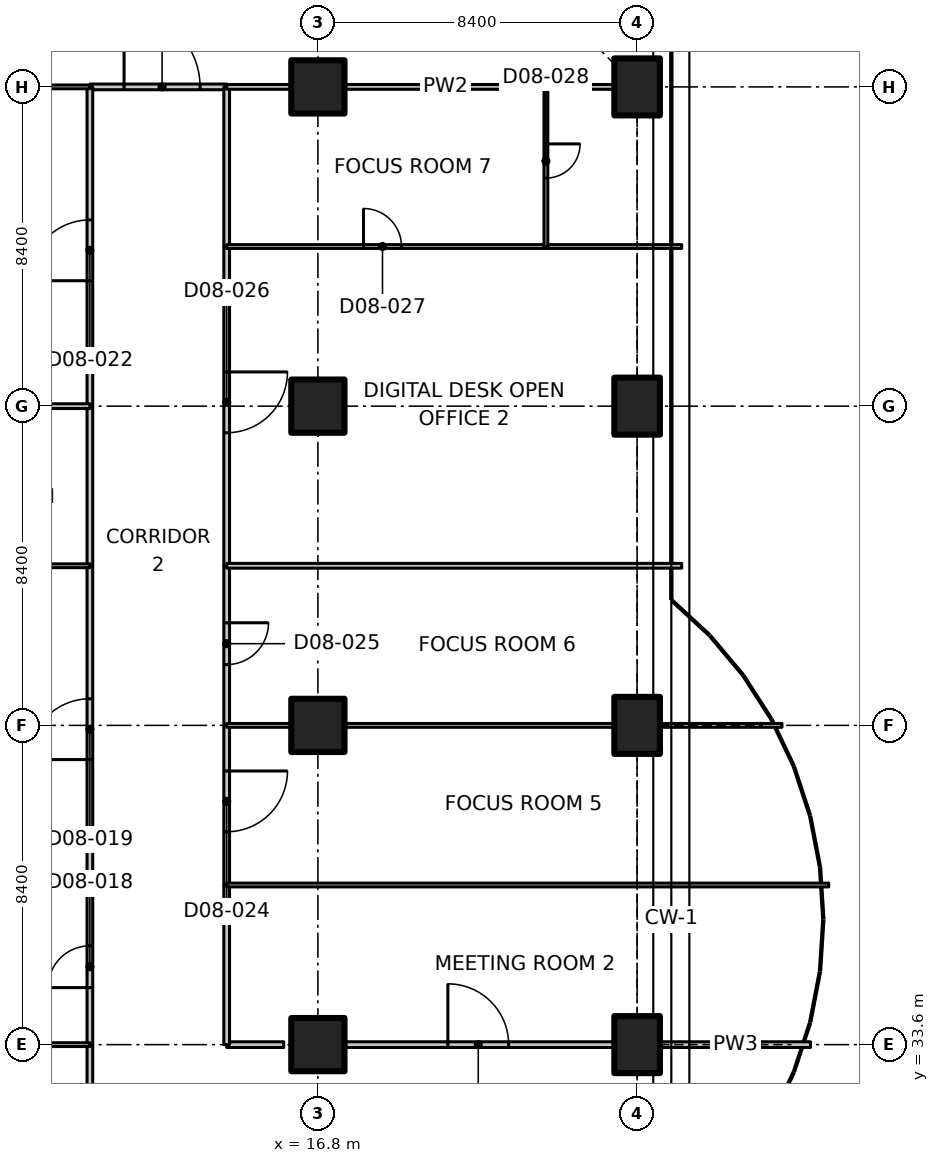
"""IFC4 building model, lengths in metres.
Left out: names, types, materials, properties, quantities, classifications, styles, units other than length and angle.
Written with IfcOpenShell. Run it as: python <this file> out.ifc"""

import sys

from ifc_helpers import new_model, si_unit, direction, frame, frame_2d, origin, origin_2d, place, context, subcontext, project, spatial, polyline, rectangle, outline, extrude, element, fill, save


model = new_model("IFC4")
c1 = context("Model", 3, precision=1e-05, world=origin(), true_north=direction((0.0, 1.0)))
c2 = subcontext(c1, "Body", "Model", "MODEL_VIEW")
j1 = project(units=[si_unit("LENGTHUNIT", "METRE"), si_unit("PLANEANGLEUNIT", "RADIAN")], contexts=[c1])
p1 = place(None, origin())
s1 = spatial("IfcSite", under=j1, at=p1, CompositionType="ELEMENT")
p2 = place(p1, origin())
s2 = spatial("IfcBuilding", under=s1, at=p2, CompositionType="ELEMENT")
p3 = place(p2, frame((0.0, 0.0, 50.9)))
s3 = spatial("IfcBuildingStorey", under=s2, at=p3, CompositionType="ELEMENT", Elevation=50.9)
for number, where, z_axis, x_axis in (
    (1, (16.8, 33.6, 0.0), (0.0, 0.0, 1.0), (1.0, 0.0, 0.0)),
    (2, (16.8, 42.0, 0.0), (0.0, 0.0, 1.0), (1.0, 0.0, 0.0)),
    (3, (16.8, 50.4, 0.0), (0.0, 0.0, 1.0), (1.0, 0.0, 0.0)),
    (4, (16.8, 58.8, 0.0), (0.0, 0.0, 1.0), (1.0, 0.0, 0.0)),
):
    element("IfcColumn", number, at=place(p3, frame(where, z_axis=z_axis, x_axis=x_axis)), inside=s3, PredefinedType="COLUMN", context=c2, shape_type="SweptSolid", body=[
        extrude(rectangle(XDim=1.4, YDim=1.4, at=origin_2d()), origin(), (0.0, 0.0, 1.0), 3.35),
    ])
for number, where, z_axis, x_axis in (
    (5, (25.2, 33.6, 0.0), (0.0, 0.0, 1.0), (1.0, 0.0, 0.0)),
    (6, (25.2, 42.0, 0.0), (0.0, 0.0, 1.0), (1.0, 0.0, 0.0)),
    (7, (25.2, 50.4, 0.0), (0.0, 0.0, 1.0), (1.0, 0.0, 0.0)),
    (8, (25.2, 58.8, 0.0), (0.0, 0.0, 1.0), (1.0, 0.0, 0.0)),
):
    element("IfcColumn", number, at=place(p3, frame(where, z_axis=z_axis, x_axis=x_axis)), inside=s3, PredefinedType="COLUMN", context=c2, shape_type="SweptSolid", body=[
        extrude(rectangle(XDim=1.2, YDim=1.5, at=origin_2d()), origin(), (0.0, 0.0, 1.0), 3.35),
    ])
p4 = place(p3, frame((10.8, 29.4, 0.0), z_axis=(0.0, 0.0, 1.0), x_axis=(0.0, 1.0, 0.0)))
e9 = element("IfcWall", 9, at=p4, inside=s3, PredefinedType="PARTITIONING", context=c2, shape_type="SweptSolid", body=[
    extrude(rectangle(XDim=4.2, YDim=0.15, at=frame_2d((2.1, 0.0))), origin(), (0.0, 0.0, 1.0), 3.33),
])
p5 = place(p4, frame((1.5, 0.0, 0.0)))
e10 = element("IfcOpeningElement", 10, at=p5, cuts=e9, PredefinedType="OPENING", context=c2, shape_type="SweptSolid", body=[
    extrude(rectangle(XDim=1.1, YDim=2.1, at=frame_2d((0.55, 1.05))), frame((0.0, 0.085, 0.0), z_axis=(0.0, -1.0, 0.0), x_axis=(1.0, 0.0, 0.0)), (0.0, 0.0, 1.0), 0.17),
])
p6 = place(p3, frame((14.4, 33.6, 0.0), z_axis=(0.0, 0.0, 1.0), x_axis=(1.0, 0.0, 0.0)))
e11 = element("IfcWall", 11, at=p6, inside=s3, PredefinedType="PARTITIONING", context=c2, shape_type="SweptSolid", body=[
    extrude(rectangle(XDim=1.5, YDim=0.15, at=frame_2d((0.75, 0.0))), origin(), (0.0, 0.0, 1.0), 3.33),
])
p7 = place(p3, frame((17.52, 33.6, 0.0), z_axis=(0.0, 0.0, 1.0), x_axis=(1.0, 0.0, 0.0)))
e12 = element("IfcWall", 12, at=p7, inside=s3, PredefinedType="PARTITIONING", context=c2, shape_type="SweptSolid", body=[
    extrude(rectangle(XDim=7.06, YDim=0.15, at=frame_2d((3.53, 0.0))), origin(), (0.0, 0.0, 1.0), 3.33),
])
p8 = place(p7, frame((2.7, 0.0, 0.0)))
e13 = element("IfcOpeningElement", 13, at=p8, cuts=e12, PredefinedType="OPENING", context=c2, shape_type="SweptSolid", body=[
    extrude(rectangle(XDim=1.6, YDim=2.1, at=frame_2d((0.8, 1.05))), frame((0.0, 0.085, 0.0), z_axis=(0.0, -1.0, 0.0), x_axis=(1.0, 0.0, 0.0)), (0.0, 0.0, 1.0), 0.17),
])
p9 = place(p3, frame((25.82, 33.6, 0.0), z_axis=(0.0, 0.0, 1.0), x_axis=(1.0, 0.0, 0.0)))
e14 = element("IfcWall", 14, at=p9, inside=s3, PredefinedType="PARTITIONING", context=c2, shape_type="SweptSolid", body=[
    extrude(rectangle(XDim=3.942, YDim=0.15, at=frame_2d((1.971, 0.0))), origin(), (0.0, 0.0, 1.0), 2.98),
])
p10 = place(p3, frame((10.8, 58.8, 0.0), z_axis=(0.0, 0.0, 1.0), x_axis=(1.0, 0.0, 0.0)))
e15 = element("IfcWall", 15, at=p10, inside=s3, PredefinedType="PARTITIONING", context=c2, shape_type="SweptSolid", body=[
    extrude(rectangle(XDim=3.6, YDim=0.15, at=frame_2d((1.8, 0.0))), origin(), (0.0, 0.0, 1.0), 3.33),
])
p11 = place(p10, frame((0.9, 0.0, 0.0)))
e16 = element("IfcOpeningElement", 16, at=p11, cuts=e15, PredefinedType="OPENING", context=c2, shape_type="SweptSolid", body=[
    extrude(rectangle(XDim=2.0, YDim=2.4, at=frame_2d((1.0, 1.2))), frame((0.0, 0.085, 0.0), z_axis=(0.0, -1.0, 0.0), x_axis=(1.0, 0.0, 0.0)), (0.0, 0.0, 1.0), 0.17),
])
p12 = place(p3, frame((10.8, 33.6, 0.0), z_axis=(0.0, 0.0, 1.0), x_axis=(0.0, 1.0, 0.0)))
e17 = element("IfcWall", 17, at=p12, inside=s3, PredefinedType="PARTITIONING", context=c2, shape_type="SweptSolid", body=[
    extrude(rectangle(XDim=4.2, YDim=0.15, at=frame_2d((2.1, 0.0))), origin(), (0.0, 0.0, 1.0), 3.33),
])
p13 = place(p12, frame((1.5, 0.0, 0.0)))
e18 = element("IfcOpeningElement", 18, at=p13, cuts=e17, PredefinedType="OPENING", context=c2, shape_type="SweptSolid", body=[
    extrude(rectangle(XDim=1.1, YDim=2.1, at=frame_2d((0.55, 1.05))), frame((0.0, 0.085, 0.0), z_axis=(0.0, -1.0, 0.0), x_axis=(1.0, 0.0, 0.0)), (0.0, 0.0, 1.0), 0.17),
])
p14 = place(p3, frame((10.8, 37.8, 0.0), z_axis=(0.0, 0.0, 1.0), x_axis=(0.0, 1.0, 0.0)))
e19 = element("IfcWall", 19, at=p14, inside=s3, PredefinedType="PARTITIONING", context=c2, shape_type="SweptSolid", body=[
    extrude(rectangle(XDim=8.4, YDim=0.15, at=frame_2d((4.2, 0.0))), origin(), (0.0, 0.0, 1.0), 3.33),
])
p15 = place(p14, frame((3.3, 0.0, 0.0)))
e20 = element("IfcOpeningElement", 20, at=p15, cuts=e19, PredefinedType="OPENING", context=c2, shape_type="SweptSolid", body=[
    extrude(rectangle(XDim=1.6, YDim=2.1, at=frame_2d((0.8, 1.05))), frame((0.0, 0.085, 0.0), z_axis=(0.0, -1.0, 0.0), x_axis=(1.0, 0.0, 0.0)), (0.0, 0.0, 1.0), 0.17),
])
p16 = place(p3, frame((10.8, 46.2, 0.0), z_axis=(0.0, 0.0, 1.0), x_axis=(0.0, 1.0, 0.0)))
e21 = element("IfcWall", 21, at=p16, inside=s3, PredefinedType="PARTITIONING", context=c2, shape_type="SweptSolid", body=[
    extrude(rectangle(XDim=4.2, YDim=0.15, at=frame_2d((2.1, 0.0))), origin(), (0.0, 0.0, 1.0), 3.33),
])
p17 = place(p3, frame((10.8, 50.4, 0.0), z_axis=(0.0, 0.0, 1.0), x_axis=(0.0, 1.0, 0.0)))
e22 = element("IfcWall", 22, at=p17, inside=s3, PredefinedType="PARTITIONING", context=c2, shape_type="SweptSolid", body=[
    extrude(rectangle(XDim=8.4, YDim=0.15, at=frame_2d((4.2, 0.0))), origin(), (0.0, 0.0, 1.0), 3.33),
])
p18 = place(p17, frame((3.3, 0.0, 0.0)))
e23 = element("IfcOpeningElement", 23, at=p18, cuts=e22, PredefinedType="OPENING", context=c2, shape_type="SweptSolid", body=[
    extrude(rectangle(XDim=1.6, YDim=2.1, at=frame_2d((0.8, 1.05))), frame((0.0, 0.085, 0.0), z_axis=(0.0, -1.0, 0.0), x_axis=(1.0, 0.0, 0.0)), (0.0, 0.0, 1.0), 0.17),
])
p19 = place(p3, frame((14.4, 37.8, 0.0), z_axis=(0.0, 0.0, 1.0), x_axis=(0.0, -1.0, 0.0)))
e24 = element("IfcWall", 24, at=p19, inside=s3, PredefinedType="PARTITIONING", context=c2, shape_type="SweptSolid", body=[
    extrude(rectangle(XDim=4.2, YDim=0.15, at=frame_2d((2.1, 0.0))), origin(), (0.0, 0.0, 1.0), 3.33),
])
p20 = place(p3, frame((14.4, 42.0, 0.0), z_axis=(0.0, 0.0, 1.0), x_axis=(0.0, -1.0, 0.0)))
e25 = element("IfcWall", 25, at=p20, inside=s3, PredefinedType="PARTITIONING", context=c2, shape_type="SweptSolid", body=[
    extrude(rectangle(XDim=4.2, YDim=0.15, at=frame_2d((2.1, 0.0))), origin(), (0.0, 0.0, 1.0), 3.33),
])
p21 = place(p20, frame((1.2, 0.0, 0.0)))
e26 = element("IfcOpeningElement", 26, at=p21, cuts=e25, PredefinedType="OPENING", context=c2, shape_type="SweptSolid", body=[
    extrude(rectangle(XDim=1.6, YDim=2.1, at=frame_2d((0.8, 1.05))), frame((0.0, 0.085, 0.0), z_axis=(0.0, -1.0, 0.0), x_axis=(1.0, 0.0, 0.0)), (0.0, 0.0, 1.0), 0.17),
])
p22 = place(p3, frame((14.4, 46.2, 0.0), z_axis=(0.0, 0.0, 1.0), x_axis=(0.0, -1.0, 0.0)))
e27 = element("IfcWall", 27, at=p22, inside=s3, PredefinedType="PARTITIONING", context=c2, shape_type="SweptSolid", body=[
    extrude(rectangle(XDim=4.2, YDim=0.15, at=frame_2d((2.1, 0.0))), origin(), (0.0, 0.0, 1.0), 3.33),
])
p23 = place(p22, frame((1.5, 0.0, 0.0)))
e28 = element("IfcOpeningElement", 28, at=p23, cuts=e27, PredefinedType="OPENING", context=c2, shape_type="SweptSolid", body=[
    extrude(rectangle(XDim=1.1, YDim=2.1, at=frame_2d((0.55, 1.05))), frame((0.0, 0.085, 0.0), z_axis=(0.0, -1.0, 0.0), x_axis=(1.0, 0.0, 0.0)), (0.0, 0.0, 1.0), 0.17),
])
p24 = place(p3, frame((14.4, 54.6, 0.0), z_axis=(0.0, 0.0, 1.0), x_axis=(0.0, -1.0, 0.0)))
e29 = element("IfcWall", 29, at=p24, inside=s3, PredefinedType="PARTITIONING", context=c2, shape_type="SweptSolid", body=[
    extrude(rectangle(XDim=8.4, YDim=0.15, at=frame_2d((4.2, 0.0))), origin(), (0.0, 0.0, 1.0), 3.33),
])
p25 = place(p24, frame((3.3, 0.0, 0.0)))
e30 = element("IfcOpeningElement", 30, at=p25, cuts=e29, PredefinedType="OPENING", context=c2, shape_type="SweptSolid", body=[
    extrude(rectangle(XDim=1.6, YDim=2.1, at=frame_2d((0.8, 1.05))), frame((0.0, 0.085, 0.0), z_axis=(0.0, -1.0, 0.0), x_axis=(1.0, 0.0, 0.0)), (0.0, 0.0, 1.0), 0.17),
])
p26 = place(p3, frame((14.4, 58.8, 0.0), z_axis=(0.0, 0.0, 1.0), x_axis=(0.0, -1.0, 0.0)))
e31 = element("IfcWall", 31, at=p26, inside=s3, PredefinedType="PARTITIONING", context=c2, shape_type="SweptSolid", body=[
    extrude(rectangle(XDim=4.2, YDim=0.15, at=frame_2d((2.1, 0.0))), origin(), (0.0, 0.0, 1.0), 3.33),
])
p27 = place(p3, frame((10.8, 58.8, 0.0), z_axis=(0.0, 0.0, 1.0), x_axis=(-1.0, 0.0, 0.0)))
e32 = element("IfcWall", 32, at=p27, inside=s3, PredefinedType="PARTITIONING", context=c2, shape_type="SweptSolid", body=[
    extrude(rectangle(XDim=1.68, YDim=0.1, at=frame_2d((0.84, 0.0))), origin(), (0.0, 0.0, 1.0), 3.33),
])
p28 = place(p3, frame((22.8, 58.8, 0.0), z_axis=(0.0, 0.0, 1.0), x_axis=(-1.0, 0.0, 0.0)))
e33 = element("IfcWall", 33, at=p28, inside=s3, PredefinedType="PARTITIONING", context=c2, shape_type="SweptSolid", body=[
    extrude(rectangle(XDim=5.28, YDim=0.125, at=frame_2d((2.64, 0.0))), origin(), (0.0, 0.0, 1.0), 3.33),
])
p29 = place(p3, frame((16.08, 58.8, 0.0), z_axis=(0.0, 0.0, 1.0), x_axis=(-1.0, 0.0, 0.0)))
e34 = element("IfcWall", 34, at=p29, inside=s3, PredefinedType="PARTITIONING", context=c2, shape_type="SweptSolid", body=[
    extrude(rectangle(XDim=1.68, YDim=0.125, at=frame_2d((0.84, 0.0))), origin(), (0.0, 0.0, 1.0), 3.33),
])
p30 = place(p3, frame((24.58, 58.8, 0.0), z_axis=(0.0, 0.0, 1.0), x_axis=(-1.0, 0.0, 0.0)))
e35 = element("IfcWall", 35, at=p30, inside=s3, PredefinedType="PARTITIONING", context=c2, shape_type="SweptSolid", body=[
    extrude(rectangle(XDim=1.78, YDim=0.125, at=frame_2d((0.89, 0.0))), origin(), (0.0, 0.0, 1.0), 3.33),
])
p31 = place(p3, frame((9.12, 33.6, 0.0), z_axis=(0.0, 0.0, 1.0), x_axis=(1.0, 0.0, 0.0)))
e36 = element("IfcWall", 36, at=p31, inside=s3, PredefinedType="PARTITIONING", context=c2, shape_type="SweptSolid", body=[
    extrude(rectangle(XDim=1.68, YDim=0.1, at=frame_2d((0.84, 0.0))), origin(), (0.0, 0.0, 1.0), 3.33),
])
p32 = place(p3, frame((-1.174, 37.8, 0.0), z_axis=(0.0, 0.0, 1.0), x_axis=(1.0, 0.0, 0.0)))
e37 = element("IfcWall", 37, at=p32, inside=s3, PredefinedType="PARTITIONING", context=c2, shape_type="SweptSolid", body=[
    extrude(outline(polyline([(0.0, 0.0), (11.974, 0.0), (11.974, 3.33), (1.624, 3.33), (1.622, 2.98), (0.726, 2.98), (0.724, 3.33), (0.074, 3.33), (0.0, 3.33), (0.0, 0.0)])), frame((0.0, 0.062, 0.0), z_axis=(0.0, -1.0, 0.0), x_axis=(1.0, 0.0, 0.0)), (0.0, 0.0, 1.0), 0.125),
])
p33 = place(p3, frame((6.0, 46.2, 0.0), z_axis=(0.0, 0.0, 1.0), x_axis=(1.0, 0.0, 0.0)))
e38 = element("IfcWall", 38, at=p33, inside=s3, PredefinedType="PARTITIONING", context=c2, shape_type="SweptSolid", body=[
    extrude(rectangle(XDim=4.8, YDim=0.1, at=frame_2d((2.4, 0.0))), origin(), (0.0, 0.0, 1.0), 3.33),
])
p34 = place(p33, frame((1.8, 0.0, 0.0)))
e39 = element("IfcOpeningElement", 39, at=p34, cuts=e38, PredefinedType="OPENING", context=c2, shape_type="SweptSolid", body=[
    extrude(rectangle(XDim=1.0, YDim=2.1, at=frame_2d((0.5, 1.05))), frame((0.0, 0.06, 0.0), z_axis=(0.0, -1.0, 0.0), x_axis=(1.0, 0.0, 0.0)), (0.0, 0.0, 1.0), 0.12),
])
p35 = place(p3, frame((9.12, 50.4, 0.0), z_axis=(0.0, 0.0, 1.0), x_axis=(1.0, 0.0, 0.0)))
e40 = element("IfcWall", 40, at=p35, inside=s3, PredefinedType="PARTITIONING", context=c2, shape_type="SweptSolid", body=[
    extrude(rectangle(XDim=1.68, YDim=0.125, at=frame_2d((0.84, 0.0))), origin(), (0.0, 0.0, 1.0), 3.33),
])
p36 = place(p3, frame((14.4, 37.8, 0.0), z_axis=(0.0, 0.0, 1.0), x_axis=(1.0, 0.0, 0.0)))
e41 = element("IfcWall", 41, at=p36, inside=s3, PredefinedType="PARTITIONING", context=c2, shape_type="SweptSolid", body=[
    extrude(outline(polyline([(0.0, 0.0), (15.843, 0.0), (15.843, 3.33), (11.25, 3.33), (11.248, 2.98), (10.352, 2.98), (10.35, 3.33), (0.0, 3.33), (0.0, 0.0)])), frame((0.0, 0.05, 0.0), z_axis=(0.0, -1.0, 0.0), x_axis=(1.0, 0.0, 0.0)), (0.0, 0.0, 1.0), 0.1),
])
p37 = place(p3, frame((14.4, 42.0, 0.0), z_axis=(0.0, 0.0, 1.0), x_axis=(1.0, 0.0, 0.0)))
e42 = element("IfcWall", 42, at=p37, inside=s3, PredefinedType="PARTITIONING", context=c2, shape_type="SweptSolid", body=[
    extrude(rectangle(XDim=1.68, YDim=0.1, at=frame_2d((0.84, 0.0))), origin(), (0.0, 0.0, 1.0), 3.33),
])
p38 = place(p3, frame((17.52, 42.0, 0.0), z_axis=(0.0, 0.0, 1.0), x_axis=(1.0, 0.0, 0.0)))
e43 = element("IfcWall", 43, at=p38, inside=s3, PredefinedType="PARTITIONING", context=c2, shape_type="SweptSolid", body=[
    extrude(rectangle(XDim=7.06, YDim=0.1, at=frame_2d((3.53, 0.0))), origin(), (0.0, 0.0, 1.0), 3.33),
])
p39 = place(p3, frame((25.82, 42.0, 0.0), z_axis=(0.0, 0.0, 1.0), x_axis=(1.0, 0.0, 0.0)))
e44 = element("IfcWall", 44, at=p39, inside=s3, PredefinedType="PARTITIONING", context=c2, shape_type="SweptSolid", body=[
    extrude(rectangle(XDim=3.191, YDim=0.1, at=frame_2d((1.596, 0.0))), origin(), (0.0, 0.0, 1.0), 2.98),
])
p40 = place(p3, frame((14.4, 46.2, 0.0), z_axis=(0.0, 0.0, 1.0), x_axis=(1.0, 0.0, 0.0)))
e45 = element("IfcWall", 45, at=p40, inside=s3, PredefinedType="PARTITIONING", context=c2, shape_type="SweptSolid", body=[
    extrude(outline(polyline([(0.0, 0.0), (11.974, 0.0), (11.974, 3.33), (11.9, 3.33), (11.25, 3.33), (11.248, 2.98), (10.352, 2.98), (10.35, 3.33), (0.0, 3.33), (0.0, 0.0)])), frame((0.0, 0.062, 0.0), z_axis=(0.0, -1.0, 0.0), x_axis=(1.0, 0.0, 0.0)), (0.0, 0.0, 1.0), 0.125),
])
p41 = place(p3, frame((14.4, 54.6, 0.0), z_axis=(0.0, 0.0, 1.0), x_axis=(1.0, 0.0, 0.0)))
e46 = element("IfcWall", 46, at=p41, inside=s3, PredefinedType="PARTITIONING", context=c2, shape_type="SweptSolid", body=[
    extrude(rectangle(XDim=8.4, YDim=0.1, at=frame_2d((4.2, 0.0))), origin(), (0.0, 0.0, 1.0), 3.33),
])
p42 = place(p41, frame((3.6, 0.0, 0.0)))
e47 = element("IfcOpeningElement", 47, at=p42, cuts=e46, PredefinedType="OPENING", context=c2, shape_type="SweptSolid", body=[
    extrude(rectangle(XDim=1.0, YDim=2.1, at=frame_2d((0.5, 1.05))), frame((0.0, 0.06, 0.0), z_axis=(0.0, -1.0, 0.0), x_axis=(1.0, 0.0, 0.0)), (0.0, 0.0, 1.0), 0.12),
])
p43 = place(p3, frame((22.8, 54.6, 0.0), z_axis=(0.0, 0.0, 1.0), x_axis=(1.0, 0.0, 0.0)))
e48 = element("IfcWall", 48, at=p43, inside=s3, PredefinedType="PARTITIONING", context=c2, shape_type="SweptSolid", body=[
    extrude(rectangle(XDim=3.574, YDim=0.1, at=frame_2d((1.787, 0.0))), origin(), (0.0, 0.0, 1.0), 2.98),
])
p44 = place(p3, frame((22.8, 58.8, 0.0), z_axis=(0.0, 0.0, 1.0), x_axis=(0.0, -1.0, 0.0)))
e49 = element("IfcWall", 49, at=p44, inside=s3, PredefinedType="PARTITIONING", context=c2, shape_type="SweptSolid", body=[
    extrude(rectangle(XDim=4.2, YDim=0.1, at=frame_2d((2.1, 0.0))), origin(), (0.0, 0.0, 1.0), 3.33),
])
p45 = place(p44, frame((1.5, 0.0, 0.0)))
e50 = element("IfcOpeningElement", 50, at=p45, cuts=e49, PredefinedType="OPENING", context=c2, shape_type="SweptSolid", body=[
    extrude(rectangle(XDim=0.9, YDim=2.1, at=frame_2d((0.45, 1.05))), frame((0.0, 0.06, 0.0), z_axis=(0.0, -1.0, 0.0), x_axis=(1.0, 0.0, 0.0)), (0.0, 0.0, 1.0), 0.12),
])
p46 = place(p11, origin())
e51 = element("IfcDoor", 51, at=p46, inside=s3, OperationType="DOUBLE_DOOR_SINGLE_SWING", PredefinedType="DOOR", context=c2, shape_type="SweptSolid", body=[
    extrude(rectangle(XDim=2.0, YDim=2.4, at=frame_2d((1.0, 1.2))), frame((0.0, 0.025, 0.0), z_axis=(0.0, -1.0, 0.0), x_axis=(1.0, 0.0, 0.0)), (0.0, 0.0, 1.0), 0.05),
])
fill(e16, e51)
p47 = place(p13, origin())
e52 = element("IfcDoor", 52, at=p47, inside=s3, OperationType="SINGLE_SWING_LEFT", PredefinedType="DOOR", context=c2, shape_type="SweptSolid", body=[
    extrude(rectangle(XDim=1.1, YDim=2.1, at=frame_2d((0.55, 1.05))), frame((0.0, 0.025, 0.0), z_axis=(0.0, -1.0, 0.0), x_axis=(1.0, 0.0, 0.0)), (0.0, 0.0, 1.0), 0.05),
])
fill(e18, e52)
p48 = place(p15, origin())
e53 = element("IfcDoor", 53, at=p48, inside=s3, OperationType="DOUBLE_DOOR_SINGLE_SWING", PredefinedType="DOOR", context=c2, shape_type="SweptSolid", body=[
    extrude(rectangle(XDim=1.6, YDim=2.1, at=frame_2d((0.8, 1.05))), frame((0.0, 0.025, 0.0), z_axis=(0.0, -1.0, 0.0), x_axis=(1.0, 0.0, 0.0)), (0.0, 0.0, 1.0), 0.05),
])
fill(e20, e53)
p49 = place(p18, origin())
e54 = element("IfcDoor", 54, at=p49, inside=s3, OperationType="DOUBLE_DOOR_SINGLE_SWING", PredefinedType="DOOR", context=c2, shape_type="SweptSolid", body=[
    extrude(rectangle(XDim=1.6, YDim=2.1, at=frame_2d((0.8, 1.05))), frame((0.0, 0.025, 0.0), z_axis=(0.0, -1.0, 0.0), x_axis=(1.0, 0.0, 0.0)), (0.0, 0.0, 1.0), 0.05),
])
fill(e23, e54)
p50 = place(p8, origin())
e55 = element("IfcDoor", 55, at=p50, inside=s3, OperationType="DOUBLE_DOOR_SINGLE_SWING", PredefinedType="DOOR", context=c2, shape_type="SweptSolid", body=[
    extrude(rectangle(XDim=1.6, YDim=2.1, at=frame_2d((0.8, 1.05))), frame((0.0, 0.025, 0.0), z_axis=(0.0, -1.0, 0.0), x_axis=(1.0, 0.0, 0.0)), (0.0, 0.0, 1.0), 0.05),
])
fill(e13, e55)
p51 = place(p21, origin())
e56 = element("IfcDoor", 56, at=p51, inside=s3, OperationType="DOUBLE_DOOR_SINGLE_SWING", PredefinedType="DOOR", context=c2, shape_type="SweptSolid", body=[
    extrude(rectangle(XDim=1.6, YDim=2.1, at=frame_2d((0.8, 1.05))), frame((0.0, 0.025, 0.0), z_axis=(0.0, -1.0, 0.0), x_axis=(1.0, 0.0, 0.0)), (0.0, 0.0, 1.0), 0.05),
])
fill(e26, e56)
p52 = place(p23, origin())
e57 = element("IfcDoor", 57, at=p52, inside=s3, OperationType="SINGLE_SWING_LEFT", PredefinedType="DOOR", context=c2, shape_type="SweptSolid", body=[
    extrude(rectangle(XDim=1.1, YDim=2.1, at=frame_2d((0.55, 1.05))), frame((0.0, 0.025, 0.0), z_axis=(0.0, -1.0, 0.0), x_axis=(1.0, 0.0, 0.0)), (0.0, 0.0, 1.0), 0.05),
])
fill(e28, e57)
p53 = place(p25, origin())
e58 = element("IfcDoor", 58, at=p53, inside=s3, OperationType="DOUBLE_DOOR_SINGLE_SWING", PredefinedType="DOOR", context=c2, shape_type="SweptSolid", body=[
    extrude(rectangle(XDim=1.6, YDim=2.1, at=frame_2d((0.8, 1.05))), frame((0.0, 0.025, 0.0), z_axis=(0.0, -1.0, 0.0), x_axis=(1.0, 0.0, 0.0)), (0.0, 0.0, 1.0), 0.05),
])
fill(e30, e58)
p54 = place(p42, origin())
e59 = element("IfcDoor", 59, at=p54, inside=s3, OperationType="SINGLE_SWING_LEFT", PredefinedType="DOOR", context=c2, shape_type="SweptSolid", body=[
    extrude(rectangle(XDim=1.0, YDim=2.1, at=frame_2d((0.5, 1.05))), frame((0.0, 0.025, 0.0), z_axis=(0.0, -1.0, 0.0), x_axis=(1.0, 0.0, 0.0)), (0.0, 0.0, 1.0), 0.05),
])
fill(e47, e59)
p55 = place(p45, origin())
e60 = element("IfcDoor", 60, at=p55, inside=s3, OperationType="SINGLE_SWING_LEFT", PredefinedType="DOOR", context=c2, shape_type="SweptSolid", body=[
    extrude(rectangle(XDim=0.9, YDim=2.1, at=frame_2d((0.45, 1.05))), frame((0.0, 0.025, 0.0), z_axis=(0.0, -1.0, 0.0), x_axis=(1.0, 0.0, 0.0)), (0.0, 0.0, 1.0), 0.05),
])
fill(e50, e60)
save(model, sys.argv[1])
